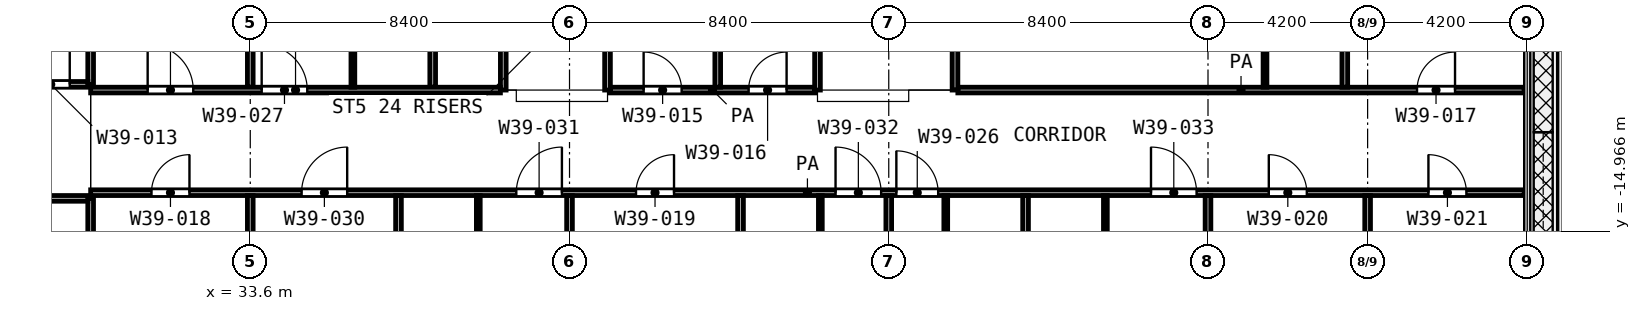
"""IFC4 building model, lengths in metres.
Left out: names, types, materials, properties, quantities, classifications, styles, units other than length and angle.
Written with IfcOpenShell. Run it as: python <this file> out.ifc"""

import sys

from ifc_helpers import new_model, si_unit, direction, frame, frame_2d, origin, place, context, subcontext, project, spatial, rectangle, extrude, element, fill, save


model = new_model("IFC4")
c1 = context("Model", 3, precision=1e-05, world=origin(), true_north=direction((0.0, 1.0)))
c2 = subcontext(c1, "Body", "Model", "MODEL_VIEW")
j1 = project(units=[si_unit("LENGTHUNIT", "METRE"), si_unit("PLANEANGLEUNIT", "RADIAN")], contexts=[c1])
p1 = place(None, origin())
s1 = spatial("IfcSite", under=j1, at=p1, CompositionType="ELEMENT")
p2 = place(p1, origin())
s2 = spatial("IfcBuilding", under=s1, at=p2, CompositionType="ELEMENT")
p3 = place(p2, frame((0.0, 0.0, 192.0)))
s3 = spatial("IfcBuildingStorey", under=s2, at=p3, CompositionType="ELEMENT", Elevation=192.0)
for number, where, z_axis, x_axis in (
    (1, (36.3, -11.175, 0.0), (0.0, 0.0, 1.0), (0.0, 1.0, 0.0)),
    (2, (39.6, -16.65, 0.0), (0.0, 0.0, 1.0), (0.0, 1.0, 0.0)),
    (3, (48.6, -16.65, 0.0), (0.0, 0.0, 1.0), (0.0, 1.0, 0.0)),
    (4, (51.9, -16.65, 0.0), (0.0, 0.0, 1.0), (0.0, 1.0, 0.0)),
    (5, (56.1, -16.65, 0.0), (0.0, 0.0, 1.0), (0.0, 1.0, 0.0)),
):
    element("IfcWall", number, at=place(p3, frame(where, z_axis=z_axis, x_axis=x_axis)), inside=s3, PredefinedType="PARTITIONING", context=c2, shape_type="SweptSolid", body=[
        extrude(rectangle(XDim=2.625, YDim=0.1, at=frame_2d((1.312, 0.0))), origin(), (0.0, 0.0, 1.0), 3.6),
    ])
p4 = place(p3, frame((60.3, -11.175, 0.0), z_axis=(0.0, 0.0, 1.0), x_axis=(0.0, 1.0, 0.0)))
e6 = element("IfcWall", 6, at=p4, inside=s3, PredefinedType="PARTITIONING", context=c2, shape_type="SweptSolid", body=[
    extrude(rectangle(XDim=2.624, YDim=0.1, at=frame_2d((1.312, 0.0))), origin(), (0.0, 0.0, 1.0), 3.6),
])
p5 = place(p3, frame((24.9, -14.1, 0.0), z_axis=(0.0, 0.0, 1.0), x_axis=(1.0, 0.0, 0.0)))
e7 = element("IfcWall", 7, at=p5, inside=s3, PredefinedType="PARTITIONING", context=c2, shape_type="SweptSolid", body=[
    extrude(rectangle(XDim=4.425, YDim=0.15, at=frame_2d((2.212, 0.0))), origin(), (0.0, 0.0, 1.0), 3.6),
])
p6 = place(p5, frame((1.65, 0.0, 0.0)))
e8 = element("IfcOpeningElement", 8, at=p6, cuts=e7, PredefinedType="OPENING", context=c2, shape_type="SweptSolid", body=[
    extrude(rectangle(XDim=1.5, YDim=2.1, at=frame_2d((0.75, 1.05))), frame((0.0, 0.085, 0.0), z_axis=(0.0, -1.0, 0.0), x_axis=(1.0, 0.0, 0.0)), (0.0, 0.0, 1.0), 0.17),
])
p7 = place(p3, frame((29.4, -13.95, 0.0), z_axis=(0.0, 0.0, 1.0), x_axis=(1.0, 0.0, 0.0)))
e9 = element("IfcWall", 9, at=p7, inside=s3, PredefinedType="PARTITIONING", context=c2, shape_type="SweptSolid", body=[
    extrude(rectangle(XDim=37.72, YDim=0.15, at=frame_2d((18.86, 0.0))), origin(), (0.0, 0.0, 1.0), 3.6),
])
p8 = place(p7, frame((1.6, 0.0, 0.0)))
e10 = element("IfcOpeningElement", 10, at=p8, cuts=e9, PredefinedType="OPENING", context=c2, shape_type="SweptSolid", body=[
    extrude(rectangle(XDim=1.0, YDim=2.1, at=frame_2d((0.5, 1.05))), frame((0.0, 0.085, 0.0), z_axis=(0.0, -1.0, 0.0), x_axis=(1.0, 0.0, 0.0)), (0.0, 0.0, 1.0), 0.17),
])
p9 = place(p7, frame((5.55, 0.0, 0.0)))
e11 = element("IfcOpeningElement", 11, at=p9, cuts=e9, PredefinedType="OPENING", context=c2, shape_type="SweptSolid", body=[
    extrude(rectangle(XDim=1.2, YDim=2.1, at=frame_2d((0.6, 1.05))), frame((0.0, 0.085, 0.0), z_axis=(0.0, -1.0, 0.0), x_axis=(1.0, 0.0, 0.0)), (0.0, 0.0, 1.0), 0.17),
])
p10 = place(p7, frame((11.2, 0.0, 0.0)))
e12 = element("IfcOpeningElement", 12, at=p10, cuts=e9, PredefinedType="OPENING", context=c2, shape_type="SweptSolid", body=[
    extrude(rectangle(XDim=1.2, YDim=2.1, at=frame_2d((0.6, 1.05))), frame((0.0, 0.085, 0.0), z_axis=(0.0, -1.0, 0.0), x_axis=(1.0, 0.0, 0.0)), (0.0, 0.0, 1.0), 0.17),
])
p11 = place(p7, frame((14.35, 0.0, 0.0)))
e13 = element("IfcOpeningElement", 13, at=p11, cuts=e9, PredefinedType="OPENING", context=c2, shape_type="SweptSolid", body=[
    extrude(rectangle(XDim=1.0, YDim=2.1, at=frame_2d((0.5, 1.05))), frame((0.0, 0.085, 0.0), z_axis=(0.0, -1.0, 0.0), x_axis=(1.0, 0.0, 0.0)), (0.0, 0.0, 1.0), 0.17),
])
p12 = place(p7, frame((19.6, 0.0, 0.0)))
e14 = element("IfcOpeningElement", 14, at=p12, cuts=e9, PredefinedType="OPENING", context=c2, shape_type="SweptSolid", body=[
    extrude(rectangle(XDim=1.2, YDim=2.1, at=frame_2d((0.6, 1.05))), frame((0.0, 0.085, 0.0), z_axis=(0.0, -1.0, 0.0), x_axis=(1.0, 0.0, 0.0)), (0.0, 0.0, 1.0), 0.17),
])
p13 = place(p7, frame((21.2, 0.0, 0.0)))
e15 = element("IfcOpeningElement", 15, at=p13, cuts=e9, PredefinedType="OPENING", context=c2, shape_type="SweptSolid", body=[
    extrude(rectangle(XDim=1.1, YDim=2.1, at=frame_2d((0.55, 1.05))), frame((0.0, 0.085, 0.0), z_axis=(0.0, -1.0, 0.0), x_axis=(1.0, 0.0, 0.0)), (0.0, 0.0, 1.0), 0.17),
])
p14 = place(p7, frame((27.9, 0.0, 0.0)))
e16 = element("IfcOpeningElement", 16, at=p14, cuts=e9, PredefinedType="OPENING", context=c2, shape_type="SweptSolid", body=[
    extrude(rectangle(XDim=1.2, YDim=2.1, at=frame_2d((0.6, 1.05))), frame((0.0, 0.085, 0.0), z_axis=(0.0, -1.0, 0.0), x_axis=(1.0, 0.0, 0.0)), (0.0, 0.0, 1.0), 0.17),
])
p15 = place(p7, frame((31.0, 0.0, 0.0)))
e17 = element("IfcOpeningElement", 17, at=p15, cuts=e9, PredefinedType="OPENING", context=c2, shape_type="SweptSolid", body=[
    extrude(rectangle(XDim=1.0, YDim=2.1, at=frame_2d((0.5, 1.05))), frame((0.0, 0.085, 0.0), z_axis=(0.0, -1.0, 0.0), x_axis=(1.0, 0.0, 0.0)), (0.0, 0.0, 1.0), 0.17),
])
p16 = place(p7, frame((35.2, 0.0, 0.0)))
e18 = element("IfcOpeningElement", 18, at=p16, cuts=e9, PredefinedType="OPENING", context=c2, shape_type="SweptSolid", body=[
    extrude(rectangle(XDim=1.0, YDim=2.1, at=frame_2d((0.5, 1.05))), frame((0.0, 0.085, 0.0), z_axis=(0.0, -1.0, 0.0), x_axis=(1.0, 0.0, 0.0)), (0.0, 0.0, 1.0), 0.17),
])
p17 = place(p3, frame((29.4, -11.25, 0.0), z_axis=(0.0, 0.0, 1.0), x_axis=(1.0, 0.0, 0.0)))
e19 = element("IfcWall", 19, at=p17, inside=s3, PredefinedType="PARTITIONING", context=c2, shape_type="SweptSolid", body=[
    extrude(rectangle(XDim=10.782, YDim=0.15, at=frame_2d((5.391, 0.0))), origin(), (0.0, 0.0, 1.0), 3.6),
])
p18 = place(p17, frame((4.5, 0.0, 0.0)))
e20 = element("IfcOpeningElement", 20, at=p18, cuts=e19, PredefinedType="OPENING", context=c2, shape_type="SweptSolid", body=[
    extrude(rectangle(XDim=1.2, YDim=2.1, at=frame_2d((0.6, 1.05))), frame((0.0, 0.085, 0.0), z_axis=(0.0, -1.0, 0.0), x_axis=(1.0, 0.0, 0.0)), (0.0, 0.0, 1.0), 0.17),
])
p19 = place(p17, frame((1.5, 0.0, 0.0)))
e21 = element("IfcOpeningElement", 21, at=p19, cuts=e19, PredefinedType="OPENING", context=c2, shape_type="SweptSolid", body=[
    extrude(rectangle(XDim=1.2, YDim=2.1, at=frame_2d((0.6, 1.05))), frame((0.0, 0.085, 0.0), z_axis=(0.0, -1.0, 0.0), x_axis=(1.0, 0.0, 0.0)), (0.0, 0.0, 1.0), 0.17),
])
p20 = place(p3, frame((43.075, -11.25, 0.0), z_axis=(0.0, 0.0, 1.0), x_axis=(1.0, 0.0, 0.0)))
e22 = element("IfcWall", 22, at=p20, inside=s3, PredefinedType="PARTITIONING", context=c2, shape_type="SweptSolid", body=[
    extrude(rectangle(XDim=5.375, YDim=0.15, at=frame_2d((2.688, 0.0))), origin(), (0.0, 0.0, 1.0), 3.6),
])
p21 = place(p20, frame((0.875, 0.0, 0.0)))
e23 = element("IfcOpeningElement", 23, at=p21, cuts=e22, PredefinedType="OPENING", context=c2, shape_type="SweptSolid", body=[
    extrude(rectangle(XDim=1.0, YDim=2.1, at=frame_2d((0.5, 1.05))), frame((0.0, 0.085, 0.0), z_axis=(0.0, -1.0, 0.0), x_axis=(1.0, 0.0, 0.0)), (0.0, 0.0, 1.0), 0.17),
])
p22 = place(p20, frame((3.637, 0.0, 0.0)))
e24 = element("IfcOpeningElement", 24, at=p22, cuts=e22, PredefinedType="OPENING", context=c2, shape_type="SweptSolid", body=[
    extrude(rectangle(XDim=1.0, YDim=2.1, at=frame_2d((0.5, 1.05))), frame((0.0, 0.085, 0.0), z_axis=(0.0, -1.0, 0.0), x_axis=(1.0, 0.0, 0.0)), (0.0, 0.0, 1.0), 0.17),
])
p23 = place(p3, frame((52.218, -11.25, 0.0), z_axis=(0.0, 0.0, 1.0), x_axis=(1.0, 0.0, 0.0)))
e25 = element("IfcWall", 25, at=p23, inside=s3, PredefinedType="PARTITIONING", context=c2, shape_type="SweptSolid", body=[
    extrude(rectangle(XDim=14.902, YDim=0.15, at=frame_2d((7.451, 0.0))), origin(), (0.0, 0.0, 1.0), 3.6),
])
p24 = place(p23, frame((12.082, 0.0, 0.0)))
e26 = element("IfcOpeningElement", 26, at=p24, cuts=e25, PredefinedType="OPENING", context=c2, shape_type="SweptSolid", body=[
    extrude(rectangle(XDim=1.0, YDim=2.1, at=frame_2d((0.5, 1.05))), frame((0.0, 0.085, 0.0), z_axis=(0.0, -1.0, 0.0), x_axis=(1.0, 0.0, 0.0)), (0.0, 0.0, 1.0), 0.17),
])
p25 = place(p3, frame((24.9, -11.1, 0.0), z_axis=(0.0, 0.0, 1.0), x_axis=(1.0, 0.0, 0.0)))
e27 = element("IfcWall", 27, at=p25, inside=s3, PredefinedType="PARTITIONING", context=c2, shape_type="SweptSolid", body=[
    extrude(rectangle(XDim=4.425, YDim=0.15, at=frame_2d((2.212, 0.0))), origin(), (0.0, 0.0, 1.0), 3.6),
])
p26 = place(p25, frame((0.9, 0.0, 0.0)))
e28 = element("IfcOpeningElement", 28, at=p26, cuts=e27, PredefinedType="OPENING", context=c2, shape_type="SweptSolid", body=[
    extrude(rectangle(XDim=0.9, YDim=2.1, at=frame_2d((0.45, 1.05))), frame((0.0, 0.085, 0.0), z_axis=(0.0, -1.0, 0.0), x_axis=(1.0, 0.0, 0.0)), (0.0, 0.0, 1.0), 0.17),
])
p27 = place(p25, frame((2.95, 0.0, 0.0)))
e29 = element("IfcOpeningElement", 29, at=p27, cuts=e27, PredefinedType="OPENING", context=c2, shape_type="SweptSolid", body=[
    extrude(rectangle(XDim=1.0, YDim=2.1, at=frame_2d((0.5, 1.05))), frame((0.0, 0.085, 0.0), z_axis=(0.0, -1.0, 0.0), x_axis=(1.0, 0.0, 0.0)), (0.0, 0.0, 1.0), 0.17),
])
p28 = place(p3, frame((29.4, -31.198, 0.0), z_axis=(0.0, 0.0, 1.0), x_axis=(0.0, 1.0, 0.0)))
e30 = element("IfcWall", 30, at=p28, inside=s3, PredefinedType="PARTITIONING", context=c2, shape_type="SweptSolid", body=[
    extrude(rectangle(XDim=17.098, YDim=0.15, at=frame_2d((8.549, 0.0))), origin(), (0.0, 0.0, 1.0), 3.6),
])
p29 = place(p3, frame((29.4, -11.1, 0.0), z_axis=(0.0, 0.0, 1.0), x_axis=(0.0, 1.0, 0.0)))
e31 = element("IfcWall", 31, at=p29, inside=s3, PredefinedType="PARTITIONING", context=c2, shape_type="SweptSolid", body=[
    extrude(rectangle(XDim=11.02, YDim=0.15, at=frame_2d((5.51, 0.0))), origin(), (0.0, 0.0, 1.0), 2.7),
])
p30 = place(p3, frame((33.6, -31.12, 0.0), z_axis=(0.0, 0.0, 1.0), x_axis=(0.0, 1.0, 0.0)))
e32 = element("IfcWall", 32, at=p30, inside=s3, PredefinedType="PARTITIONING", context=c2, shape_type="SweptSolid", body=[
    extrude(rectangle(XDim=17.095, YDim=0.15, at=frame_2d((8.548, 0.0))), origin(), (0.0, 0.0, 1.0), 3.6),
])
p31 = place(p3, frame((33.6, -11.175, 0.0), z_axis=(0.0, 0.0, 1.0), x_axis=(0.0, 1.0, 0.0)))
e33 = element("IfcWall", 33, at=p31, inside=s3, PredefinedType="PARTITIONING", context=c2, shape_type="SweptSolid", body=[
    extrude(rectangle(XDim=11.095, YDim=0.15, at=frame_2d((5.547, 0.0))), origin(), (0.0, 0.0, 1.0), 3.6),
])
p32 = place(p3, frame((37.5, -31.12, 0.0), z_axis=(0.0, 0.0, 1.0), x_axis=(0.0, 1.0, 0.0)))
e34 = element("IfcWall", 34, at=p32, inside=s3, PredefinedType="PARTITIONING", context=c2, shape_type="SweptSolid", body=[
    extrude(rectangle(XDim=17.095, YDim=0.15, at=frame_2d((8.548, 0.0))), origin(), (0.0, 0.0, 1.0), 3.6),
])
p33 = place(p3, frame((38.4, -11.175, 0.0), z_axis=(0.0, 0.0, 1.0), x_axis=(0.0, 1.0, 0.0)))
e35 = element("IfcWall", 35, at=p33, inside=s3, PredefinedType="PARTITIONING", context=c2, shape_type="SweptSolid", body=[
    extrude(rectangle(XDim=11.095, YDim=0.15, at=frame_2d((5.547, 0.0))), origin(), (0.0, 0.0, 1.0), 2.7),
])
p34 = place(p3, frame((40.257, -11.25, 0.0), z_axis=(0.0, 0.0, 1.0), x_axis=(0.0, 1.0, 0.0)))
e36 = element("IfcWall", 36, at=p34, inside=s3, PredefinedType="PARTITIONING", context=c2, shape_type="SweptSolid", body=[
    extrude(rectangle(XDim=11.17, YDim=0.15, at=frame_2d((5.585, 0.0))), origin(), (0.0, 0.0, 1.0), 2.7),
])
p35 = place(p34, frame((4.95, 0.0, 0.0)))
e37 = element("IfcOpeningElement", 37, at=p35, cuts=e36, PredefinedType="OPENING", context=c2, shape_type="SweptSolid", body=[
    extrude(rectangle(XDim=1.0, YDim=2.1, at=frame_2d((0.5, 1.05))), frame((0.0, 0.085, 0.0), z_axis=(0.0, -1.0, 0.0), x_axis=(1.0, 0.0, 0.0)), (0.0, 0.0, 1.0), 0.17),
])
p36 = place(p3, frame((42.0, -31.12, 0.0), z_axis=(0.0, 0.0, 1.0), x_axis=(0.0, 1.0, 0.0)))
e38 = element("IfcWall", 38, at=p36, inside=s3, PredefinedType="PARTITIONING", context=c2, shape_type="SweptSolid", body=[
    extrude(rectangle(XDim=17.095, YDim=0.15, at=frame_2d((8.548, 0.0))), origin(), (0.0, 0.0, 1.0), 3.6),
])
p37 = place(p3, frame((43.0, -11.25, 0.0), z_axis=(0.0, 0.0, 1.0), x_axis=(0.0, 1.0, 0.0)))
e39 = element("IfcWall", 39, at=p37, inside=s3, PredefinedType="PARTITIONING", context=c2, shape_type="SweptSolid", body=[
    extrude(rectangle(XDim=2.348, YDim=0.15, at=frame_2d((1.174, 0.0))), origin(), (0.0, 0.0, 1.0), 3.6),
])
p38 = place(p3, frame((45.9, -11.175, 0.0), z_axis=(0.0, 0.0, 1.0), x_axis=(0.0, 1.0, 0.0)))
e40 = element("IfcWall", 40, at=p38, inside=s3, PredefinedType="PARTITIONING", context=c2, shape_type="SweptSolid", body=[
    extrude(rectangle(XDim=2.525, YDim=0.15, at=frame_2d((1.263, 0.0))), origin(), (0.0, 0.0, 1.0), 3.6),
])
p39 = place(p3, frame((46.5, -31.12, 0.0), z_axis=(0.0, 0.0, 1.0), x_axis=(0.0, 1.0, 0.0)))
e41 = element("IfcWall", 41, at=p39, inside=s3, PredefinedType="PARTITIONING", context=c2, shape_type="SweptSolid", body=[
    extrude(rectangle(XDim=17.095, YDim=0.15, at=frame_2d((8.548, 0.0))), origin(), (0.0, 0.0, 1.0), 3.6),
])
p40 = place(p3, frame((48.525, -11.25, 0.0), z_axis=(0.0, 0.0, 1.0), x_axis=(0.0, 1.0, 0.0)))
e42 = element("IfcWall", 42, at=p40, inside=s3, PredefinedType="PARTITIONING", context=c2, shape_type="SweptSolid", body=[
    extrude(rectangle(XDim=2.6, YDim=0.15, at=frame_2d((1.3, 0.0))), origin(), (0.0, 0.0, 1.0), 3.6),
])
p41 = place(p3, frame((50.4, -31.12, 0.0), z_axis=(0.0, 0.0, 1.0), x_axis=(0.0, 1.0, 0.0)))
e43 = element("IfcWall", 43, at=p41, inside=s3, PredefinedType="PARTITIONING", context=c2, shape_type="SweptSolid", body=[
    extrude(rectangle(XDim=17.095, YDim=0.15, at=frame_2d((8.548, 0.0))), origin(), (0.0, 0.0, 1.0), 3.6),
])
p42 = place(p3, frame((52.143, -11.25, 0.0), z_axis=(0.0, 0.0, 1.0), x_axis=(0.0, 1.0, 0.0)))
e44 = element("IfcWall", 44, at=p42, inside=s3, PredefinedType="PARTITIONING", context=c2, shape_type="SweptSolid", body=[
    extrude(rectangle(XDim=9.398, YDim=0.15, at=frame_2d((4.699, 0.0))), origin(), (0.0, 0.0, 1.0), 3.6),
])
p43 = place(p42, frame((5.665, 0.0, 0.0)))
e45 = element("IfcOpeningElement", 45, at=p43, cuts=e44, PredefinedType="OPENING", context=c2, shape_type="SweptSolid", body=[
    extrude(rectangle(XDim=1.2, YDim=2.1, at=frame_2d((0.6, 1.05))), frame((0.0, 0.085, 0.0), z_axis=(0.0, -1.0, 0.0), x_axis=(1.0, 0.0, 0.0)), (0.0, 0.0, 1.0), 0.17),
])
p44 = place(p42, frame((3.333, 0.0, 0.0)))
e46 = element("IfcOpeningElement", 46, at=p44, cuts=e44, PredefinedType="OPENING", context=c2, shape_type="SweptSolid", body=[
    extrude(rectangle(XDim=1.2, YDim=2.1, at=frame_2d((0.6, 1.05))), frame((0.0, 0.085, 0.0), z_axis=(0.0, -1.0, 0.0), x_axis=(1.0, 0.0, 0.0)), (0.0, 0.0, 1.0), 0.17),
])
for number, where, z_axis, x_axis in (
    (47, (54.0, -31.12, 0.0), (0.0, 0.0, 1.0), (0.0, 1.0, 0.0)),
    (48, (58.8, -31.12, 0.0), (0.0, 0.0, 1.0), (0.0, 1.0, 0.0)),
):
    element("IfcWall", number, at=place(p3, frame(where, z_axis=z_axis, x_axis=x_axis)), inside=s3, PredefinedType="PARTITIONING", context=c2, shape_type="SweptSolid", body=[
        extrude(rectangle(XDim=17.095, YDim=0.15, at=frame_2d((8.548, 0.0))), origin(), (0.0, 0.0, 1.0), 3.6),
    ])
p45 = place(p3, frame((62.4, -11.175, 0.0), z_axis=(0.0, 0.0, 1.0), x_axis=(0.0, 1.0, 0.0)))
e49 = element("IfcWall", 49, at=p45, inside=s3, PredefinedType="PARTITIONING", context=c2, shape_type="SweptSolid", body=[
    extrude(rectangle(XDim=9.862, YDim=0.15, at=frame_2d((4.931, 0.0))), origin(), (0.0, 0.0, 1.0), 2.7),
])
p46 = place(p3, frame((63.0, -29.287, 0.0), z_axis=(0.0, 0.0, 1.0), x_axis=(0.0, 1.0, 0.0)))
e50 = element("IfcWall", 50, at=p46, inside=s3, PredefinedType="PARTITIONING", context=c2, shape_type="SweptSolid", body=[
    extrude(rectangle(XDim=15.262, YDim=0.15, at=frame_2d((7.631, 0.0))), origin(), (0.0, 0.0, 1.0), 3.6),
])
p47 = place(p18, origin())
e51 = element("IfcDoor", 51, at=p47, inside=s3, OperationType="SINGLE_SWING_LEFT", PredefinedType="DOOR", context=c2, shape_type="SweptSolid", body=[
    extrude(rectangle(XDim=1.2, YDim=2.1, at=frame_2d((0.6, 1.05))), frame((0.0, 0.025, 0.0), z_axis=(0.0, -1.0, 0.0), x_axis=(1.0, 0.0, 0.0)), (0.0, 0.0, 1.0), 0.05),
])
fill(e20, e51)
p48 = place(p21, origin())
e52 = element("IfcDoor", 52, at=p48, inside=s3, OperationType="SINGLE_SWING_LEFT", PredefinedType="DOOR", context=c2, shape_type="SweptSolid", body=[
    extrude(rectangle(XDim=1.0, YDim=2.1, at=frame_2d((0.5, 1.05))), frame((0.0, 0.025, 0.0), z_axis=(0.0, -1.0, 0.0), x_axis=(1.0, 0.0, 0.0)), (0.0, 0.0, 1.0), 0.05),
])
fill(e23, e52)
p49 = place(p22, origin())
e53 = element("IfcDoor", 53, at=p49, inside=s3, OperationType="SINGLE_SWING_RIGHT", PredefinedType="DOOR", context=c2, shape_type="SweptSolid", body=[
    extrude(rectangle(XDim=1.0, YDim=2.1, at=frame_2d((0.5, 1.05))), frame((0.0, 0.025, 0.0), z_axis=(0.0, -1.0, 0.0), x_axis=(1.0, 0.0, 0.0)), (0.0, 0.0, 1.0), 0.05),
])
fill(e24, e53)
p50 = place(p24, origin())
e54 = element("IfcDoor", 54, at=p50, inside=s3, OperationType="SINGLE_SWING_RIGHT", PredefinedType="DOOR", context=c2, shape_type="SweptSolid", body=[
    extrude(rectangle(XDim=1.0, YDim=2.1, at=frame_2d((0.5, 1.05))), frame((0.0, 0.025, 0.0), z_axis=(0.0, -1.0, 0.0), x_axis=(1.0, 0.0, 0.0)), (0.0, 0.0, 1.0), 0.05),
])
fill(e26, e54)
p51 = place(p8, origin())
e55 = element("IfcDoor", 55, at=p51, inside=s3, OperationType="SINGLE_SWING_RIGHT", PredefinedType="DOOR", context=c2, shape_type="SweptSolid", body=[
    extrude(rectangle(XDim=1.0, YDim=2.1, at=frame_2d((0.5, 1.05))), frame((0.0, 0.025, 0.0), z_axis=(0.0, -1.0, 0.0), x_axis=(1.0, 0.0, 0.0)), (0.0, 0.0, 1.0), 0.05),
])
fill(e10, e55)
p52 = place(p9, origin())
e56 = element("IfcDoor", 56, at=p52, inside=s3, OperationType="SINGLE_SWING_RIGHT", PredefinedType="DOOR", context=c2, shape_type="SweptSolid", body=[
    extrude(rectangle(XDim=1.2, YDim=2.1, at=frame_2d((0.6, 1.05))), frame((0.0, 0.025, 0.0), z_axis=(0.0, -1.0, 0.0), x_axis=(1.0, 0.0, 0.0)), (0.0, 0.0, 1.0), 0.05),
])
fill(e11, e56)
p53 = place(p10, origin())
e57 = element("IfcDoor", 57, at=p53, inside=s3, OperationType="SINGLE_SWING_RIGHT", PredefinedType="DOOR", context=c2, shape_type="SweptSolid", body=[
    extrude(rectangle(XDim=1.2, YDim=2.1, at=frame_2d((0.6, 1.05))), frame((0.0, 0.025, 0.0), z_axis=(0.0, -1.0, 0.0), x_axis=(1.0, 0.0, 0.0)), (0.0, 0.0, 1.0), 0.05),
])
fill(e12, e57)
p54 = place(p11, origin())
e58 = element("IfcDoor", 58, at=p54, inside=s3, OperationType="SINGLE_SWING_RIGHT", PredefinedType="DOOR", context=c2, shape_type="SweptSolid", body=[
    extrude(rectangle(XDim=1.0, YDim=2.1, at=frame_2d((0.5, 1.05))), frame((0.0, 0.025, 0.0), z_axis=(0.0, -1.0, 0.0), x_axis=(1.0, 0.0, 0.0)), (0.0, 0.0, 1.0), 0.05),
])
fill(e13, e58)
p55 = place(p12, origin())
e59 = element("IfcDoor", 59, at=p55, inside=s3, OperationType="SINGLE_SWING_LEFT", PredefinedType="DOOR", context=c2, shape_type="SweptSolid", body=[
    extrude(rectangle(XDim=1.2, YDim=2.1, at=frame_2d((0.6, 1.05))), frame((0.0, 0.025, 0.0), z_axis=(0.0, -1.0, 0.0), x_axis=(1.0, 0.0, 0.0)), (0.0, 0.0, 1.0), 0.05),
])
fill(e14, e59)
p56 = place(p13, origin())
e60 = element("IfcDoor", 60, at=p56, inside=s3, OperationType="SINGLE_SWING_LEFT", PredefinedType="DOOR", context=c2, shape_type="SweptSolid", body=[
    extrude(rectangle(XDim=1.1, YDim=2.1, at=frame_2d((0.55, 1.05))), frame((0.0, 0.025, 0.0), z_axis=(0.0, -1.0, 0.0), x_axis=(1.0, 0.0, 0.0)), (0.0, 0.0, 1.0), 0.05),
])
fill(e15, e60)
p57 = place(p14, origin())
e61 = element("IfcDoor", 61, at=p57, inside=s3, OperationType="SINGLE_SWING_LEFT", PredefinedType="DOOR", context=c2, shape_type="SweptSolid", body=[
    extrude(rectangle(XDim=1.2, YDim=2.1, at=frame_2d((0.6, 1.05))), frame((0.0, 0.025, 0.0), z_axis=(0.0, -1.0, 0.0), x_axis=(1.0, 0.0, 0.0)), (0.0, 0.0, 1.0), 0.05),
])
fill(e16, e61)
p58 = place(p15, origin())
e62 = element("IfcDoor", 62, at=p58, inside=s3, OperationType="SINGLE_SWING_LEFT", PredefinedType="DOOR", context=c2, shape_type="SweptSolid", body=[
    extrude(rectangle(XDim=1.0, YDim=2.1, at=frame_2d((0.5, 1.05))), frame((0.0, 0.025, 0.0), z_axis=(0.0, -1.0, 0.0), x_axis=(1.0, 0.0, 0.0)), (0.0, 0.0, 1.0), 0.05),
])
fill(e17, e62)
p59 = place(p16, origin())
e63 = element("IfcDoor", 63, at=p59, inside=s3, OperationType="SINGLE_SWING_LEFT", PredefinedType="DOOR", context=c2, shape_type="SweptSolid", body=[
    extrude(rectangle(XDim=1.0, YDim=2.1, at=frame_2d((0.5, 1.05))), frame((0.0, 0.025, 0.0), z_axis=(0.0, -1.0, 0.0), x_axis=(1.0, 0.0, 0.0)), (0.0, 0.0, 1.0), 0.05),
])
fill(e18, e63)
p60 = place(p27, origin())
e64 = element("IfcDoor", 64, at=p60, inside=s3, OperationType="SINGLE_SWING_RIGHT", PredefinedType="DOOR", context=c2, shape_type="SweptSolid", body=[
    extrude(rectangle(XDim=1.0, YDim=2.1, at=frame_2d((0.5, 1.05))), frame((0.0, 0.025, 0.0), z_axis=(0.0, -1.0, 0.0), x_axis=(1.0, 0.0, 0.0)), (0.0, 0.0, 1.0), 0.05),
])
fill(e29, e64)
p61 = place(p19, origin())
e65 = element("IfcDoor", 65, at=p61, inside=s3, OperationType="SINGLE_SWING_LEFT", PredefinedType="DOOR", context=c2, shape_type="SweptSolid", body=[
    extrude(rectangle(XDim=1.2, YDim=2.1, at=frame_2d((0.6, 1.05))), frame((0.0, 0.025, 0.0), z_axis=(0.0, -1.0, 0.0), x_axis=(1.0, 0.0, 0.0)), (0.0, 0.0, 1.0), 0.05),
])
fill(e21, e65)
save(model, sys.argv[1])
